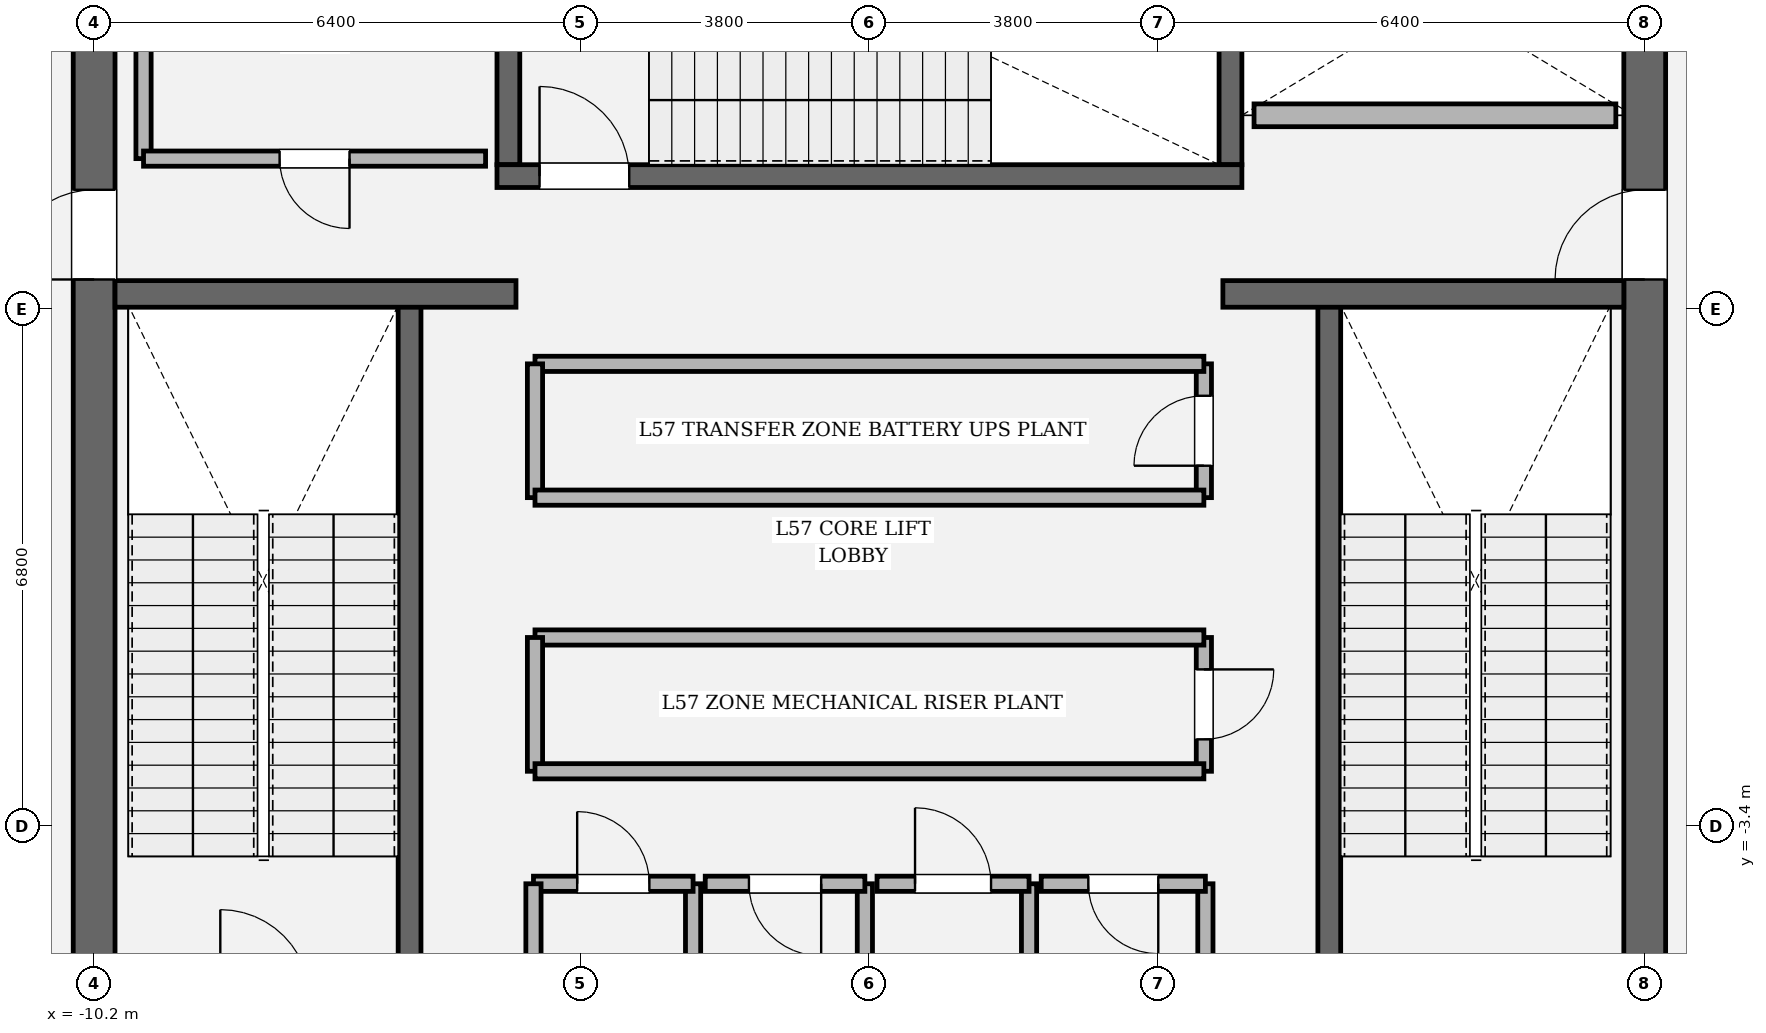
"""IFC4 building model, lengths in metres.
Left out: names, types, materials, properties, quantities, classifications, styles, units other than length and angle.
Written with IfcOpenShell. Run it as: python <this file> out.ifc"""

import sys

from ifc_helpers import new_model, si_unit, direction, frame, frame_2d, origin, place, context, subcontext, project, spatial, rectangle, extrude, element, fill, save


model = new_model("IFC4")
c1 = context("Model", 3, precision=1e-05, world=origin(), true_north=direction((0.0, 1.0)))
c2 = subcontext(c1, "Body", "Model", "MODEL_VIEW")
j1 = project(units=[si_unit("LENGTHUNIT", "METRE"), si_unit("PLANEANGLEUNIT", "RADIAN")], contexts=[c1])
p1 = place(None, origin())
s1 = spatial("IfcSite", under=j1, at=p1, CompositionType="ELEMENT")
p2 = place(p1, origin())
s2 = spatial("IfcBuilding", under=s1, at=p2, CompositionType="ELEMENT")
p3 = place(p2, frame((0.0, 0.0, 241.8)))
s3 = spatial("IfcBuildingStorey", under=s2, at=p3, CompositionType="ELEMENT", Elevation=241.8)
p4 = place(p3, frame((-10.2, -8.925, 0.0), z_axis=(0.0, 0.0, 1.0), x_axis=(0.0, 1.0, 0.0)))
e1 = element("IfcWall", 1, at=p4, inside=s3, PredefinedType="SHEAR", context=c2, shape_type="SweptSolid", body=[
    extrude(rectangle(XDim=17.85, YDim=0.55, at=frame_2d((8.925, 0.0))), origin(), (0.0, 0.0, 1.0), 4.8),
])
p5 = place(p4, frame((12.715, 0.0, 0.0)))
e2 = element("IfcOpeningElement", 2, at=p5, cuts=e1, PredefinedType="OPENING", context=c2, shape_type="SweptSolid", body=[
    extrude(rectangle(XDim=1.18, YDim=2.2, at=frame_2d((0.59, 1.1))), frame((0.0, 0.285, 0.0), z_axis=(0.0, -1.0, 0.0), x_axis=(1.0, 0.0, 0.0)), (0.0, 0.0, 1.0), 0.57),
])
p6 = place(p3, frame((10.2, 8.925, 0.0), z_axis=(0.0, 0.0, 1.0), x_axis=(0.0, -1.0, 0.0)))
e3 = element("IfcWall", 3, at=p6, inside=s3, PredefinedType="SHEAR", context=c2, shape_type="SweptSolid", body=[
    extrude(rectangle(XDim=17.85, YDim=0.55, at=frame_2d((8.925, 0.0))), origin(), (0.0, 0.0, 1.0), 4.8),
])
p7 = place(p6, frame((3.955, 0.0, 0.0)))
e4 = element("IfcOpeningElement", 4, at=p7, cuts=e3, PredefinedType="OPENING", context=c2, shape_type="SweptSolid", body=[
    extrude(rectangle(XDim=1.18, YDim=2.2, at=frame_2d((0.59, 1.1))), frame((0.0, 0.285, 0.0), z_axis=(0.0, -1.0, 0.0), x_axis=(1.0, 0.0, 0.0)), (0.0, 0.0, 1.0), 0.57),
])
for number, where, z_axis, x_axis in (
    (5, (-6.05, -5.5, 0.0), (0.0, 0.0, 1.0), (0.0, 1.0, 0.0)),
    (6, (6.05, 3.45, 0.0), (0.0, 0.0, 1.0), (0.0, -1.0, 0.0)),
):
    element("IfcWall", number, at=place(p3, frame(where, z_axis=z_axis, x_axis=x_axis)), inside=s3, PredefinedType="SOLIDWALL", context=c2, shape_type="SweptSolid", body=[
        extrude(rectangle(XDim=8.95, YDim=0.3, at=frame_2d((4.475, 0.0))), origin(), (0.0, 0.0, 1.0), 4.8),
    ])
for number, where, z_axis, x_axis in (
    (7, (-4.75, 5.3, 0.0), (0.0, 0.0, 1.0), (0.0, 1.0, 0.0)),
    (8, (4.75, 8.925, 0.0), (0.0, 0.0, 1.0), (0.0, -1.0, 0.0)),
):
    element("IfcWall", number, at=place(p3, frame(where, z_axis=z_axis, x_axis=x_axis)), inside=s3, PredefinedType="SOLIDWALL", context=c2, shape_type="SweptSolid", body=[
        extrude(rectangle(XDim=3.625, YDim=0.3, at=frame_2d((1.812, 0.0))), origin(), (0.0, 0.0, 1.0), 4.8),
    ])
p8 = place(p3, frame((-4.9, 5.15, 0.0), z_axis=(0.0, 0.0, 1.0), x_axis=(1.0, 0.0, 0.0)))
e9 = element("IfcWall", 9, at=p8, inside=s3, PredefinedType="SOLIDWALL", context=c2, shape_type="SweptSolid", body=[
    extrude(rectangle(XDim=9.8, YDim=0.3, at=frame_2d((4.9, 0.0))), origin(), (0.0, 0.0, 1.0), 4.8),
])
p9 = place(p8, frame((0.56, 0.0, 0.0)))
e10 = element("IfcOpeningElement", 10, at=p9, cuts=e9, PredefinedType="OPENING", context=c2, shape_type="SweptSolid", body=[
    extrude(rectangle(XDim=1.18, YDim=2.2, at=frame_2d((0.59, 1.1))), frame((0.0, 0.16, 0.0), z_axis=(0.0, -1.0, 0.0), x_axis=(1.0, 0.0, 0.0)), (0.0, 0.0, 1.0), 0.32),
])
for number, where, z_axis, x_axis in (
    (11, (-9.925, 3.6, 0.0), (0.0, 0.0, 1.0), (1.0, 0.0, 0.0)),
    (12, (4.65, 3.6, 0.0), (0.0, 0.0, 1.0), (1.0, 0.0, 0.0)),
):
    element("IfcWall", number, at=place(p3, frame(where, z_axis=z_axis, x_axis=x_axis)), inside=s3, PredefinedType="SOLIDWALL", context=c2, shape_type="SweptSolid", body=[
        extrude(rectangle(XDim=5.275, YDim=0.35, at=frame_2d((2.638, 0.0))), origin(), (0.0, 0.0, 1.0), 4.8),
    ])
p10 = place(p3, frame((5.06, 5.95, 0.0), z_axis=(0.0, 0.0, 1.0), x_axis=(1.0, 0.0, 0.0)))
e13 = element("IfcWall", 13, at=p10, inside=s3, PredefinedType="SOLIDWALL", context=c2, shape_type="SweptSolid", body=[
    extrude(rectangle(XDim=4.76, YDim=0.3, at=frame_2d((2.38, 0.0))), origin(), (0.0, 0.0, 1.0), 4.54),
])
p11 = place(p3, frame((-2.32, -5.9, 0.0), z_axis=(0.0, 0.0, 1.0), x_axis=(0.0, 1.0, 0.0)))
e14 = element("IfcWall", 14, at=p11, inside=s3, PredefinedType="SOLIDWALL", context=c2, shape_type="SweptSolid", body=[
    extrude(rectangle(XDim=1.74, YDim=0.2, at=frame_2d((0.87, 0.0))), origin(), (0.0, 0.0, 1.0), 4.54),
])
p12 = place(p3, frame((-2.32, -4.16, 0.0), z_axis=(0.0, 0.0, 1.0), x_axis=(-1.0, 0.0, 0.0)))
e15 = element("IfcWall", 15, at=p12, inside=s3, PredefinedType="SOLIDWALL", context=c2, shape_type="SweptSolid", body=[
    extrude(rectangle(XDim=2.1, YDim=0.2, at=frame_2d((1.05, 0.0))), origin(), (0.0, 0.0, 1.0), 4.54),
])
p13 = place(p12, frame((0.575, 0.0, 0.0)))
e16 = element("IfcOpeningElement", 16, at=p13, cuts=e15, PredefinedType="OPENING", context=c2, shape_type="SweptSolid", body=[
    extrude(rectangle(XDim=0.95, YDim=2.15, at=frame_2d((0.475, 1.075))), frame((0.0, 0.11, 0.0), z_axis=(0.0, -1.0, 0.0), x_axis=(1.0, 0.0, 0.0)), (0.0, 0.0, 1.0), 0.22),
])
for number, where, z_axis, x_axis in (
    (17, (-4.42, -4.16, 0.0), (0.0, 0.0, 1.0), (0.0, -1.0, 0.0)),
    (18, (-0.06, -5.9, 0.0), (0.0, 0.0, 1.0), (0.0, 1.0, 0.0)),
):
    element("IfcWall", number, at=place(p3, frame(where, z_axis=z_axis, x_axis=x_axis)), inside=s3, PredefinedType="SOLIDWALL", context=c2, shape_type="SweptSolid", body=[
        extrude(rectangle(XDim=1.74, YDim=0.2, at=frame_2d((0.87, 0.0))), origin(), (0.0, 0.0, 1.0), 4.54),
    ])
p14 = place(p3, frame((-0.06, -4.16, 0.0), z_axis=(0.0, 0.0, 1.0), x_axis=(-1.0, 0.0, 0.0)))
e19 = element("IfcWall", 19, at=p14, inside=s3, PredefinedType="SOLIDWALL", context=c2, shape_type="SweptSolid", body=[
    extrude(rectangle(XDim=2.1, YDim=0.2, at=frame_2d((1.05, 0.0))), origin(), (0.0, 0.0, 1.0), 4.54),
])
p15 = place(p14, frame((0.575, 0.0, 0.0)))
e20 = element("IfcOpeningElement", 20, at=p15, cuts=e19, PredefinedType="OPENING", context=c2, shape_type="SweptSolid", body=[
    extrude(rectangle(XDim=0.95, YDim=2.15, at=frame_2d((0.475, 1.075))), frame((0.0, 0.11, 0.0), z_axis=(0.0, -1.0, 0.0), x_axis=(1.0, 0.0, 0.0)), (0.0, 0.0, 1.0), 0.22),
])
p16 = place(p3, frame((2.1, -5.9, 0.0), z_axis=(0.0, 0.0, 1.0), x_axis=(0.0, 1.0, 0.0)))
e21 = element("IfcWall", 21, at=p16, inside=s3, PredefinedType="SOLIDWALL", context=c2, shape_type="SweptSolid", body=[
    extrude(rectangle(XDim=1.74, YDim=0.2, at=frame_2d((0.87, 0.0))), origin(), (0.0, 0.0, 1.0), 4.54),
])
p17 = place(p3, frame((2.1, -4.16, 0.0), z_axis=(0.0, 0.0, 1.0), x_axis=(-1.0, 0.0, 0.0)))
e22 = element("IfcWall", 22, at=p17, inside=s3, PredefinedType="SOLIDWALL", context=c2, shape_type="SweptSolid", body=[
    extrude(rectangle(XDim=2.0, YDim=0.2, at=frame_2d((1.0, 0.0))), origin(), (0.0, 0.0, 1.0), 4.54),
])
p18 = place(p17, frame((0.5, 0.0, 0.0)))
e23 = element("IfcOpeningElement", 23, at=p18, cuts=e22, PredefinedType="OPENING", context=c2, shape_type="SweptSolid", body=[
    extrude(rectangle(XDim=1.0, YDim=2.15, at=frame_2d((0.5, 1.075))), frame((0.0, 0.11, 0.0), z_axis=(0.0, -1.0, 0.0), x_axis=(1.0, 0.0, 0.0)), (0.0, 0.0, 1.0), 0.22),
])
p19 = place(p3, frame((4.42, -5.9, 0.0), z_axis=(0.0, 0.0, 1.0), x_axis=(0.0, 1.0, 0.0)))
e24 = element("IfcWall", 24, at=p19, inside=s3, PredefinedType="SOLIDWALL", context=c2, shape_type="SweptSolid", body=[
    extrude(rectangle(XDim=1.74, YDim=0.2, at=frame_2d((0.87, 0.0))), origin(), (0.0, 0.0, 1.0), 4.54),
])
p20 = place(p3, frame((4.42, -4.16, 0.0), z_axis=(0.0, 0.0, 1.0), x_axis=(-1.0, 0.0, 0.0)))
e25 = element("IfcWall", 25, at=p20, inside=s3, PredefinedType="SOLIDWALL", context=c2, shape_type="SweptSolid", body=[
    extrude(rectangle(XDim=2.16, YDim=0.2, at=frame_2d((1.08, 0.0))), origin(), (0.0, 0.0, 1.0), 4.54),
])
p21 = place(p20, frame((0.62, 0.0, 0.0)))
e26 = element("IfcOpeningElement", 26, at=p21, cuts=e25, PredefinedType="OPENING", context=c2, shape_type="SweptSolid", body=[
    extrude(rectangle(XDim=0.92, YDim=2.1, at=frame_2d((0.46, 1.05))), frame((0.0, 0.11, 0.0), z_axis=(0.0, -1.0, 0.0), x_axis=(1.0, 0.0, 0.0)), (0.0, 0.0, 1.0), 0.22),
])
p22 = place(p3, frame((4.4, -2.68, 0.0), z_axis=(0.0, 0.0, 1.0), x_axis=(0.0, 1.0, 0.0)))
e27 = element("IfcWall", 27, at=p22, inside=s3, PredefinedType="SOLIDWALL", context=c2, shape_type="SweptSolid", body=[
    extrude(rectangle(XDim=1.76, YDim=0.2, at=frame_2d((0.88, 0.0))), origin(), (0.0, 0.0, 1.0), 4.54),
])
p23 = place(p22, frame((0.42, 0.0, 0.0)))
e28 = element("IfcOpeningElement", 28, at=p23, cuts=e27, PredefinedType="OPENING", context=c2, shape_type="SweptSolid", body=[
    extrude(rectangle(XDim=0.92, YDim=2.1, at=frame_2d((0.46, 1.05))), frame((0.0, 0.11, 0.0), z_axis=(0.0, -1.0, 0.0), x_axis=(1.0, 0.0, 0.0)), (0.0, 0.0, 1.0), 0.22),
])
p24 = place(p3, frame((4.4, -0.92, 0.0), z_axis=(0.0, 0.0, 1.0), x_axis=(-1.0, 0.0, 0.0)))
e29 = element("IfcWall", 29, at=p24, inside=s3, PredefinedType="SOLIDWALL", context=c2, shape_type="SweptSolid", body=[
    extrude(rectangle(XDim=8.8, YDim=0.2, at=frame_2d((4.4, 0.0))), origin(), (0.0, 0.0, 1.0), 4.54),
])
p25 = place(p3, frame((-4.4, -0.92, 0.0), z_axis=(0.0, 0.0, 1.0), x_axis=(0.0, -1.0, 0.0)))
e30 = element("IfcWall", 30, at=p25, inside=s3, PredefinedType="SOLIDWALL", context=c2, shape_type="SweptSolid", body=[
    extrude(rectangle(XDim=1.76, YDim=0.2, at=frame_2d((0.88, 0.0))), origin(), (0.0, 0.0, 1.0), 4.54),
])
p26 = place(p3, frame((-4.4, -2.68, 0.0), z_axis=(0.0, 0.0, 1.0), x_axis=(1.0, 0.0, 0.0)))
e31 = element("IfcWall", 31, at=p26, inside=s3, PredefinedType="SOLIDWALL", context=c2, shape_type="SweptSolid", body=[
    extrude(rectangle(XDim=8.8, YDim=0.2, at=frame_2d((4.4, 0.0))), origin(), (0.0, 0.0, 1.0), 4.54),
])
p27 = place(p3, frame((4.4, 0.92, 0.0), z_axis=(0.0, 0.0, 1.0), x_axis=(0.0, 1.0, 0.0)))
e32 = element("IfcWall", 32, at=p27, inside=s3, PredefinedType="SOLIDWALL", context=c2, shape_type="SweptSolid", body=[
    extrude(rectangle(XDim=1.76, YDim=0.2, at=frame_2d((0.88, 0.0))), origin(), (0.0, 0.0, 1.0), 4.54),
])
p28 = place(p27, frame((0.42, 0.0, 0.0)))
e33 = element("IfcOpeningElement", 33, at=p28, cuts=e32, PredefinedType="OPENING", context=c2, shape_type="SweptSolid", body=[
    extrude(rectangle(XDim=0.92, YDim=2.1, at=frame_2d((0.46, 1.05))), frame((0.0, 0.11, 0.0), z_axis=(0.0, -1.0, 0.0), x_axis=(1.0, 0.0, 0.0)), (0.0, 0.0, 1.0), 0.22),
])
p29 = place(p3, frame((4.4, 2.68, 0.0), z_axis=(0.0, 0.0, 1.0), x_axis=(-1.0, 0.0, 0.0)))
e34 = element("IfcWall", 34, at=p29, inside=s3, PredefinedType="SOLIDWALL", context=c2, shape_type="SweptSolid", body=[
    extrude(rectangle(XDim=8.8, YDim=0.2, at=frame_2d((4.4, 0.0))), origin(), (0.0, 0.0, 1.0), 4.54),
])
p30 = place(p3, frame((-4.4, 2.68, 0.0), z_axis=(0.0, 0.0, 1.0), x_axis=(0.0, -1.0, 0.0)))
e35 = element("IfcWall", 35, at=p30, inside=s3, PredefinedType="SOLIDWALL", context=c2, shape_type="SweptSolid", body=[
    extrude(rectangle(XDim=1.76, YDim=0.2, at=frame_2d((0.88, 0.0))), origin(), (0.0, 0.0, 1.0), 4.54),
])
p31 = place(p3, frame((-4.4, 0.92, 0.0), z_axis=(0.0, 0.0, 1.0), x_axis=(1.0, 0.0, 0.0)))
e36 = element("IfcWall", 36, at=p31, inside=s3, PredefinedType="SOLIDWALL", context=c2, shape_type="SweptSolid", body=[
    extrude(rectangle(XDim=8.8, YDim=0.2, at=frame_2d((4.4, 0.0))), origin(), (0.0, 0.0, 1.0), 4.54),
])
p32 = place(p3, frame((-9.55, 8.65, 0.0), z_axis=(0.0, 0.0, 1.0), x_axis=(0.0, -1.0, 0.0)))
e37 = element("IfcWall", 37, at=p32, inside=s3, PredefinedType="SOLIDWALL", context=c2, shape_type="SweptSolid", body=[
    extrude(rectangle(XDim=3.27, YDim=0.2, at=frame_2d((1.635, 0.0))), origin(), (0.0, 0.0, 1.0), 4.54),
])
p33 = place(p3, frame((-9.55, 5.38, 0.0), z_axis=(0.0, 0.0, 1.0), x_axis=(1.0, 0.0, 0.0)))
e38 = element("IfcWall", 38, at=p33, inside=s3, PredefinedType="SOLIDWALL", context=c2, shape_type="SweptSolid", body=[
    extrude(rectangle(XDim=4.5, YDim=0.2, at=frame_2d((2.25, 0.0))), origin(), (0.0, 0.0, 1.0), 4.54),
])
p34 = place(p33, frame((1.79, 0.0, 0.0)))
e39 = element("IfcOpeningElement", 39, at=p34, cuts=e38, PredefinedType="OPENING", context=c2, shape_type="SweptSolid", body=[
    extrude(rectangle(XDim=0.92, YDim=2.1, at=frame_2d((0.46, 1.05))), frame((0.0, 0.11, 0.0), z_axis=(0.0, -1.0, 0.0), x_axis=(1.0, 0.0, 0.0)), (0.0, 0.0, 1.0), 0.22),
])
p35 = place(p9, origin())
e40 = element("IfcDoor", 40, at=p35, inside=s3, OperationType="SINGLE_SWING_LEFT", PredefinedType="DOOR", context=c2, shape_type="SweptSolid", body=[
    extrude(rectangle(XDim=1.18, YDim=2.2, at=frame_2d((0.59, 1.1))), frame((0.0, 0.025, 0.0), z_axis=(0.0, -1.0, 0.0), x_axis=(1.0, 0.0, 0.0)), (0.0, 0.0, 1.0), 0.05),
])
fill(e10, e40)
p36 = place(p5, origin())
e41 = element("IfcDoor", 41, at=p36, inside=s3, OperationType="SINGLE_SWING_LEFT", PredefinedType="DOOR", context=c2, shape_type="SweptSolid", body=[
    extrude(rectangle(XDim=1.18, YDim=2.2, at=frame_2d((0.59, 1.1))), frame((0.0, 0.025, 0.0), z_axis=(0.0, -1.0, 0.0), x_axis=(1.0, 0.0, 0.0)), (0.0, 0.0, 1.0), 0.05),
])
fill(e2, e41)
p37 = place(p7, origin())
e42 = element("IfcDoor", 42, at=p37, inside=s3, OperationType="SINGLE_SWING_RIGHT", PredefinedType="DOOR", context=c2, shape_type="SweptSolid", body=[
    extrude(rectangle(XDim=1.18, YDim=2.2, at=frame_2d((0.59, 1.1))), frame((0.0, 0.025, 0.0), z_axis=(0.0, -1.0, 0.0), x_axis=(1.0, 0.0, 0.0)), (0.0, 0.0, 1.0), 0.05),
])
fill(e4, e42)
p38 = place(p13, origin())
e43 = element("IfcDoor", 43, at=p38, inside=s3, OperationType="SINGLE_SWING_RIGHT", PredefinedType="DOOR", context=c2, shape_type="SweptSolid", body=[
    extrude(rectangle(XDim=0.95, YDim=2.15, at=frame_2d((0.475, 1.075))), frame((0.0, 0.025, 0.0), z_axis=(0.0, -1.0, 0.0), x_axis=(1.0, 0.0, 0.0)), (0.0, 0.0, 1.0), 0.05),
])
fill(e16, e43)
p39 = place(p15, origin())
e44 = element("IfcDoor", 44, at=p39, inside=s3, OperationType="SINGLE_SWING_LEFT", PredefinedType="DOOR", context=c2, shape_type="SweptSolid", body=[
    extrude(rectangle(XDim=0.95, YDim=2.15, at=frame_2d((0.475, 1.075))), frame((0.0, 0.025, 0.0), z_axis=(0.0, -1.0, 0.0), x_axis=(1.0, 0.0, 0.0)), (0.0, 0.0, 1.0), 0.05),
])
fill(e20, e44)
p40 = place(p18, origin())
e45 = element("IfcDoor", 45, at=p40, inside=s3, OperationType="SINGLE_SWING_RIGHT", PredefinedType="DOOR", context=c2, shape_type="SweptSolid", body=[
    extrude(rectangle(XDim=1.0, YDim=2.15, at=frame_2d((0.5, 1.075))), frame((0.0, 0.025, 0.0), z_axis=(0.0, -1.0, 0.0), x_axis=(1.0, 0.0, 0.0)), (0.0, 0.0, 1.0), 0.05),
])
fill(e23, e45)
p41 = place(p21, origin())
e46 = element("IfcDoor", 46, at=p41, inside=s3, OperationType="SINGLE_SWING_LEFT", PredefinedType="DOOR", context=c2, shape_type="SweptSolid", body=[
    extrude(rectangle(XDim=0.92, YDim=2.1, at=frame_2d((0.46, 1.05))), frame((0.0, 0.025, 0.0), z_axis=(0.0, -1.0, 0.0), x_axis=(1.0, 0.0, 0.0)), (0.0, 0.0, 1.0), 0.05),
])
fill(e26, e46)
p42 = place(p23, origin())
e47 = element("IfcDoor", 47, at=p42, inside=s3, OperationType="SINGLE_SWING_RIGHT", PredefinedType="DOOR", context=c2, shape_type="SweptSolid", body=[
    extrude(rectangle(XDim=0.92, YDim=2.1, at=frame_2d((0.46, 1.05))), frame((0.0, 0.025, 0.0), z_axis=(0.0, -1.0, 0.0), x_axis=(1.0, 0.0, 0.0)), (0.0, 0.0, 1.0), 0.05),
])
fill(e28, e47)
p43 = place(p28, origin())
e48 = element("IfcDoor", 48, at=p43, inside=s3, OperationType="SINGLE_SWING_LEFT", PredefinedType="DOOR", context=c2, shape_type="SweptSolid", body=[
    extrude(rectangle(XDim=0.92, YDim=2.1, at=frame_2d((0.46, 1.05))), frame((0.0, 0.025, 0.0), z_axis=(0.0, -1.0, 0.0), x_axis=(1.0, 0.0, 0.0)), (0.0, 0.0, 1.0), 0.05),
])
fill(e33, e48)
p44 = place(p34, origin())
e49 = element("IfcDoor", 49, at=p44, inside=s3, OperationType="SINGLE_SWING_RIGHT", PredefinedType="DOOR", context=c2, shape_type="SweptSolid", body=[
    extrude(rectangle(XDim=0.92, YDim=2.1, at=frame_2d((0.46, 1.05))), frame((0.0, 0.025, 0.0), z_axis=(0.0, -1.0, 0.0), x_axis=(1.0, 0.0, 0.0)), (0.0, 0.0, 1.0), 0.05),
])
fill(e39, e49)
save(model, sys.argv[1])
